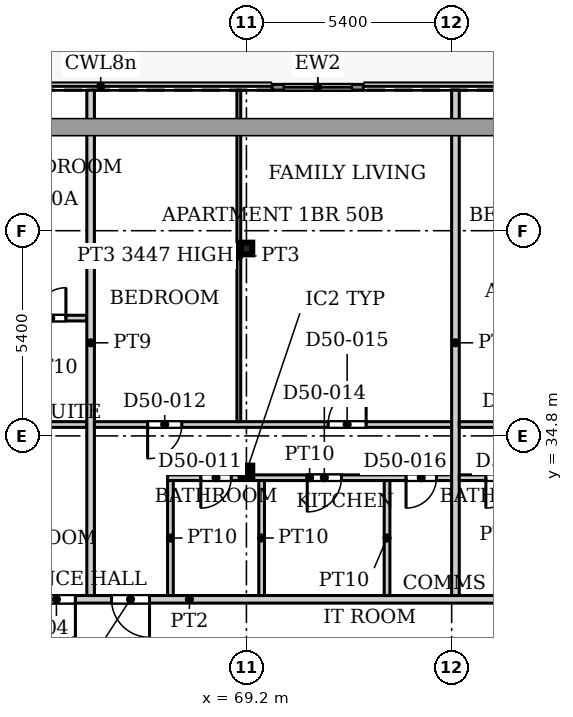
"""IFC4 building model, lengths in metres.
Left out: names, types, materials, properties, quantities, classifications, styles, units other than length and angle.
Written with IfcOpenShell. Run it as: python <this file> out.ifc"""

import sys

from ifc_helpers import new_model, si_unit, direction, frame, frame_2d, origin, origin_2d, place, context, subcontext, project, spatial, rectangle, hollow_rectangle, extrude, source, transform, mapped, element, fill, save


model = new_model("IFC4")
c1 = context("Model", 3, precision=1e-05, world=origin(), true_north=direction((0.0, 1.0)))
c2 = subcontext(c1, "Body", "Model", "MODEL_VIEW")
j1 = project(units=[si_unit("LENGTHUNIT", "METRE"), si_unit("PLANEANGLEUNIT", "RADIAN")], contexts=[c1])
p1 = place(None, origin())
s1 = spatial("IfcSite", under=j1, at=p1, CompositionType="ELEMENT")
p2 = place(p1, origin())
s2 = spatial("IfcBuilding", under=s1, at=p2, CompositionType="ELEMENT")
p3 = place(p2, frame((0.0, 0.0, 216.2)))
s3 = spatial("IfcBuildingStorey", under=s2, at=p3, CompositionType="ELEMENT", Elevation=216.2)
for number, where, z_axis, x_axis in (
    (1, (69.2, 33.863, 0.0), (0.0, 0.0, 1.0), (1.0, 0.0, 0.0)),
    (2, (69.2, 39.732, 0.0), (0.0, 0.0, 1.0), (1.0, 0.0, 0.0)),
):
    element("IfcColumn", number, at=place(p3, frame(where, z_axis=z_axis, x_axis=x_axis)), inside=s3, PredefinedType="COLUMN", context=c2, shape_type="SweptSolid", body=[
        extrude(hollow_rectangle(XDim=0.305, YDim=0.305, WallThickness=0.016, InnerFilletRadius=0.016, OuterFilletRadius=0.032, at=origin_2d()), origin(), (0.0, 0.0, 1.0), 3.9),
    ])
p4 = place(p3, frame((69.877, 43.975, 0.0), z_axis=(0.0, 0.0, 1.0), x_axis=(1.0, 0.0, 0.0)))
e3 = element("IfcWall", 3, at=p4, inside=s3, PredefinedType="SOLIDWALL", context=c2, shape_type="SweptSolid", body=[
    extrude(rectangle(XDim=2.4, YDim=0.15, at=frame_2d((1.2, 0.0))), origin(), (0.0, 0.0, 1.0), 3.75),
])
p5 = place(p4, frame((0.3, 0.0, 0.0)))
e4 = element("IfcOpeningElement", 4, at=p5, cuts=e3, PredefinedType="OPENING", context=c2, shape_type="SweptSolid", body=[
    extrude(rectangle(XDim=1.8, YDim=2.4, at=frame_2d((0.9, 1.2))), frame((0.0, 0.085, 0.0), z_axis=(0.0, -1.0, 0.0), x_axis=(1.0, 0.0, 0.0)), (0.0, 0.0, 1.0), 0.17),
])
p6 = place(p3, frame((53.499, 30.5, 0.0), z_axis=(0.0, 0.0, 1.0), x_axis=(1.0, 0.0, 0.0)))
e5 = element("IfcWall", 5, at=p6, inside=s3, PredefinedType="PARTITIONING", context=c2, shape_type="SweptSolid", body=[
    extrude(rectangle(XDim=28.401, YDim=0.2, at=frame_2d((14.2, 0.0))), origin(), (0.0, 0.0, 1.0), 3.6),
])
p7 = place(p6, frame((10.201, 0.0, 0.0)))
e6 = element("IfcOpeningElement", 6, at=p7, cuts=e5, PredefinedType="OPENING", context=c2, shape_type="SweptSolid", body=[
    extrude(rectangle(XDim=1.0, YDim=2.1, at=frame_2d((0.5, 1.05))), frame((0.0, 0.11, 0.0), z_axis=(0.0, -1.0, 0.0), x_axis=(1.0, 0.0, 0.0)), (0.0, 0.0, 1.0), 0.22),
])
p8 = place(p6, frame((12.151, 0.0, 0.0)))
e7 = element("IfcOpeningElement", 7, at=p8, cuts=e5, PredefinedType="OPENING", context=c2, shape_type="SweptSolid", body=[
    extrude(rectangle(XDim=1.0, YDim=2.1, at=frame_2d((0.5, 1.05))), frame((0.0, 0.11, 0.0), z_axis=(0.0, -1.0, 0.0), x_axis=(1.0, 0.0, 0.0)), (0.0, 0.0, 1.0), 0.22),
])
p9 = place(p6, frame((24.001, 0.0, 0.0)))
e8 = element("IfcOpeningElement", 8, at=p9, cuts=e5, PredefinedType="OPENING", context=c2, shape_type="SweptSolid", body=[
    extrude(rectangle(XDim=1.0, YDim=2.1, at=frame_2d((0.5, 1.05))), frame((0.0, 0.11, 0.0), z_axis=(0.0, -1.0, 0.0), x_axis=(1.0, 0.0, 0.0)), (0.0, 0.0, 1.0), 0.22),
])
p10 = place(p3, frame((53.499, 35.1, 0.0), z_axis=(0.0, 0.0, 1.0), x_axis=(1.0, 0.0, 0.0)))
e9 = element("IfcWall", 9, at=p10, inside=s3, PredefinedType="PARTITIONING", context=c2, shape_type="SweptSolid", body=[
    extrude(rectangle(XDim=11.501, YDim=0.15, at=frame_2d((5.75, 0.0))), origin(), (0.0, 0.0, 1.0), 3.6),
])
p11 = place(p10, frame((5.001, 0.0, 0.0)))
e10 = element("IfcOpeningElement", 10, at=p11, cuts=e9, PredefinedType="OPENING", context=c2, shape_type="SweptSolid", body=[
    extrude(rectangle(XDim=0.9, YDim=2.1, at=frame_2d((0.45, 1.05))), frame((0.0, 0.085, 0.0), z_axis=(0.0, -1.0, 0.0), x_axis=(1.0, 0.0, 0.0)), (0.0, 0.0, 1.0), 0.17),
])
p12 = place(p10, frame((1.701, 0.0, 0.0)))
e11 = element("IfcOpeningElement", 11, at=p12, cuts=e9, PredefinedType="OPENING", context=c2, shape_type="SweptSolid", body=[
    extrude(rectangle(XDim=1.0, YDim=2.1, at=frame_2d((0.5, 1.05))), frame((0.0, 0.085, 0.0), z_axis=(0.0, -1.0, 0.0), x_axis=(1.0, 0.0, 0.0)), (0.0, 0.0, 1.0), 0.17),
])
p13 = place(p10, frame((7.701, 0.0, 0.0)))
e12 = element("IfcOpeningElement", 12, at=p13, cuts=e9, PredefinedType="OPENING", context=c2, shape_type="SweptSolid", body=[
    extrude(rectangle(XDim=0.9, YDim=2.1, at=frame_2d((0.45, 1.05))), frame((0.0, 0.085, 0.0), z_axis=(0.0, -1.0, 0.0), x_axis=(1.0, 0.0, 0.0)), (0.0, 0.0, 1.0), 0.17),
])
p14 = place(p3, frame((63.075, 37.9, 0.0), z_axis=(0.0, 0.0, 1.0), x_axis=(1.0, 0.0, 0.0)))
e13 = element("IfcWall", 13, at=p14, inside=s3, PredefinedType="PARTITIONING", context=c2, shape_type="SweptSolid", body=[
    extrude(rectangle(XDim=1.925, YDim=0.15, at=frame_2d((0.962, 0.0))), origin(), (0.0, 0.0, 1.0), 3.6),
])
p15 = place(p14, frame((0.575, 0.0, 0.0)))
e14 = element("IfcOpeningElement", 14, at=p15, cuts=e13, PredefinedType="OPENING", context=c2, shape_type="SweptSolid", body=[
    extrude(rectangle(XDim=0.8, YDim=2.1, at=frame_2d((0.4, 1.05))), frame((0.0, 0.085, 0.0), z_axis=(0.0, -1.0, 0.0), x_axis=(1.0, 0.0, 0.0)), (0.0, 0.0, 1.0), 0.17),
])
p16 = place(p3, frame((65.1, 30.6, 0.0), z_axis=(0.0, 0.0, 1.0), x_axis=(0.0, 1.0, 0.0)))
e15 = element("IfcWall", 15, at=p16, inside=s3, PredefinedType="PARTITIONING", context=c2, shape_type="SweptSolid", body=[
    extrude(rectangle(XDim=13.3, YDim=0.2, at=frame_2d((6.65, 0.0))), origin(), (0.0, 0.0, 1.0), 3.6),
])
p17 = place(p3, frame((65.2, 35.1, 0.0), z_axis=(0.0, 0.0, 1.0), x_axis=(1.0, 0.0, 0.0)))
e16 = element("IfcWall", 16, at=p17, inside=s3, PredefinedType="PARTITIONING", context=c2, shape_type="SweptSolid", body=[
    extrude(rectangle(XDim=9.4, YDim=0.15, at=frame_2d((4.7, 0.0))), origin(), (0.0, 0.0, 1.0), 3.6),
])
p18 = place(p17, frame((1.4, 0.0, 0.0)))
e17 = element("IfcOpeningElement", 17, at=p18, cuts=e16, PredefinedType="OPENING", context=c2, shape_type="SweptSolid", body=[
    extrude(rectangle(XDim=0.9, YDim=2.1, at=frame_2d((0.45, 1.05))), frame((0.0, 0.085, 0.0), z_axis=(0.0, -1.0, 0.0), x_axis=(1.0, 0.0, 0.0)), (0.0, 0.0, 1.0), 0.17),
])
p19 = place(p17, frame((6.15, 0.0, 0.0)))
e18 = element("IfcOpeningElement", 18, at=p19, cuts=e16, PredefinedType="OPENING", context=c2, shape_type="SweptSolid", body=[
    extrude(rectangle(XDim=1.0, YDim=2.1, at=frame_2d((0.5, 1.05))), frame((0.0, 0.085, 0.0), z_axis=(0.0, -1.0, 0.0), x_axis=(1.0, 0.0, 0.0)), (0.0, 0.0, 1.0), 0.17),
])
p20 = place(p3, frame((67.125, 33.7, 0.0), z_axis=(0.0, 0.0, 1.0), x_axis=(1.0, 0.0, 0.0)))
e19 = element("IfcWall", 19, at=p20, inside=s3, PredefinedType="PARTITIONING", context=c2, shape_type="SweptSolid", body=[
    extrude(rectangle(XDim=7.475, YDim=0.15, at=frame_2d((3.738, 0.0))), origin(), (0.0, 0.0, 1.0), 3.6),
])
p21 = place(p20, frame((0.875, 0.0, 0.0)))
e20 = element("IfcOpeningElement", 20, at=p21, cuts=e19, PredefinedType="OPENING", context=c2, shape_type="SweptSolid", body=[
    extrude(rectangle(XDim=0.8, YDim=2.1, at=frame_2d((0.4, 1.05))), frame((0.0, 0.085, 0.0), z_axis=(0.0, -1.0, 0.0), x_axis=(1.0, 0.0, 0.0)), (0.0, 0.0, 1.0), 0.17),
])
p22 = place(p20, frame((3.675, 0.0, 0.0)))
e21 = element("IfcOpeningElement", 21, at=p22, cuts=e19, PredefinedType="OPENING", context=c2, shape_type="SweptSolid", body=[
    extrude(rectangle(XDim=0.9, YDim=2.1, at=frame_2d((0.45, 1.05))), frame((0.0, 0.085, 0.0), z_axis=(0.0, -1.0, 0.0), x_axis=(1.0, 0.0, 0.0)), (0.0, 0.0, 1.0), 0.17),
])
p23 = place(p20, frame((6.275, 0.0, 0.0)))
e22 = element("IfcOpeningElement", 22, at=p23, cuts=e19, PredefinedType="OPENING", context=c2, shape_type="SweptSolid", body=[
    extrude(rectangle(XDim=0.8, YDim=2.1, at=frame_2d((0.4, 1.05))), frame((0.0, 0.085, 0.0), z_axis=(0.0, -1.0, 0.0), x_axis=(1.0, 0.0, 0.0)), (0.0, 0.0, 1.0), 0.17),
])
p24 = place(p3, frame((67.2, 30.6, 0.0), z_axis=(0.0, 0.0, 1.0), x_axis=(0.0, 1.0, 0.0)))
e23 = element("IfcWall", 23, at=p24, inside=s3, PredefinedType="PARTITIONING", context=c2, shape_type="SweptSolid", body=[
    extrude(rectangle(XDim=3.025, YDim=0.15, at=frame_2d((1.512, 0.0))), origin(), (0.0, 0.0, 1.0), 3.6),
])
p25 = place(p3, frame((69.0, 35.175, 0.0), z_axis=(0.0, 0.0, 1.0), x_axis=(0.0, 1.0, 0.0)))
e24 = element("IfcWall", 24, at=p25, inside=s3, PredefinedType="PARTITIONING", context=c2, shape_type="SweptSolid", body=[
    extrude(rectangle(XDim=8.725, YDim=0.1, at=frame_2d((4.362, 0.0))), origin(), (0.0, 0.0, 1.0), 3.447),
])
for number, where, z_axis, x_axis in (
    (25, (69.6, 30.6, 0.0), (0.0, 0.0, 1.0), (0.0, 1.0, 0.0)),
    (26, (72.9, 30.6, 0.0), (0.0, 0.0, 1.0), (0.0, 1.0, 0.0)),
):
    element("IfcWall", number, at=place(p3, frame(where, z_axis=z_axis, x_axis=x_axis)), inside=s3, PredefinedType="PARTITIONING", context=c2, shape_type="SweptSolid", body=[
        extrude(rectangle(XDim=3.025, YDim=0.15, at=frame_2d((1.512, 0.0))), origin(), (0.0, 0.0, 1.0), 3.6),
    ])
p26 = place(p3, frame((74.7, 30.6, 0.0), z_axis=(0.0, 0.0, 1.0), x_axis=(0.0, 1.0, 0.0)))
e27 = element("IfcWall", 27, at=p26, inside=s3, PredefinedType="PARTITIONING", context=c2, shape_type="SweptSolid", body=[
    extrude(rectangle(XDim=13.3, YDim=0.2, at=frame_2d((6.65, 0.0))), origin(), (0.0, 0.0, 1.0), 3.6),
])
p27 = place(p3, frame((74.8, 33.7, 0.0), z_axis=(0.0, 0.0, 1.0), x_axis=(1.0, 0.0, 0.0)))
e28 = element("IfcWall", 28, at=p27, inside=s3, PredefinedType="PARTITIONING", context=c2, shape_type="SweptSolid", body=[
    extrude(rectangle(XDim=2.225, YDim=0.15, at=frame_2d((1.112, 0.0))), origin(), (0.0, 0.0, 1.0), 3.6),
])
p28 = place(p27, frame((0.7, 0.0, 0.0)))
e29 = element("IfcOpeningElement", 29, at=p28, cuts=e28, PredefinedType="OPENING", context=c2, shape_type="SweptSolid", body=[
    extrude(rectangle(XDim=0.8, YDim=2.1, at=frame_2d((0.4, 1.05))), frame((0.0, 0.085, 0.0), z_axis=(0.0, -1.0, 0.0), x_axis=(1.0, 0.0, 0.0)), (0.0, 0.0, 1.0), 0.17),
])
p29 = place(p3, frame((74.8, 35.1, 0.0), z_axis=(0.0, 0.0, 1.0), x_axis=(1.0, 0.0, 0.0)))
e30 = element("IfcWall", 30, at=p29, inside=s3, PredefinedType="PARTITIONING", context=c2, shape_type="SweptSolid", body=[
    extrude(rectangle(XDim=8.9, YDim=0.15, at=frame_2d((4.45, 0.0))), origin(), (0.0, 0.0, 1.0), 3.6),
])
p30 = place(p29, frame((1.25, 0.0, 0.0)))
e31 = element("IfcOpeningElement", 31, at=p30, cuts=e30, PredefinedType="OPENING", context=c2, shape_type="SweptSolid", body=[
    extrude(rectangle(XDim=0.9, YDim=2.1, at=frame_2d((0.45, 1.05))), frame((0.0, 0.085, 0.0), z_axis=(0.0, -1.0, 0.0), x_axis=(1.0, 0.0, 0.0)), (0.0, 0.0, 1.0), 0.17),
])
p31 = place(p29, frame((5.7, 0.0, 0.0)))
e32 = element("IfcOpeningElement", 32, at=p31, cuts=e30, PredefinedType="OPENING", context=c2, shape_type="SweptSolid", body=[
    extrude(rectangle(XDim=1.0, YDim=2.1, at=frame_2d((0.5, 1.05))), frame((0.0, 0.085, 0.0), z_axis=(0.0, -1.0, 0.0), x_axis=(1.0, 0.0, 0.0)), (0.0, 0.0, 1.0), 0.17),
])
m1 = source(origin(), c2, "Body", "SweptSolid", [
    extrude(rectangle(XDim=1.8, YDim=2.4, at=frame_2d((0.9, 1.2))), frame((0.0, 0.025, 0.0), z_axis=(0.0, -1.0, 0.0), x_axis=(1.0, 0.0, 0.0)), (0.0, 0.0, 1.0), 0.05),
])
p32 = place(p5, origin())
e33 = element("IfcDoor", 33, at=p32, inside=s3, OperationType="SLIDING_TO_LEFT", PredefinedType="DOOR", context=c2, shape_type="MappedRepresentation", body=[
    mapped(m1, transform((0.0, 0.0, 0.0), x_axis=(1.0, 0.0, 0.0), y_axis=(0.0, 1.0, 0.0), z_axis=(0.0, 0.0, 1.0), scale=1.0)),
])
fill(e4, e33)
m2 = source(origin(), c2, "Body", "SweptSolid", [
    extrude(rectangle(XDim=0.8, YDim=2.1, at=frame_2d((0.4, 1.05))), frame((0.0, 0.025, 0.0), z_axis=(0.0, -1.0, 0.0), x_axis=(1.0, 0.0, 0.0)), (0.0, 0.0, 1.0), 0.05),
])
p33 = place(p15, origin())
e34 = element("IfcDoor", 34, at=p33, inside=s3, OperationType="SINGLE_SWING_LEFT", PredefinedType="DOOR", context=c2, shape_type="MappedRepresentation", body=[
    mapped(m2, transform((0.0, 0.0, 0.0), x_axis=(1.0, 0.0, 0.0), y_axis=(0.0, 1.0, 0.0), z_axis=(0.0, 0.0, 1.0), scale=1.0)),
])
fill(e14, e34)
m3 = source(origin(), c2, "Body", "SweptSolid", [
    extrude(rectangle(XDim=1.0, YDim=2.1, at=frame_2d((0.5, 1.05))), frame((0.0, 0.025, 0.0), z_axis=(0.0, -1.0, 0.0), x_axis=(1.0, 0.0, 0.0)), (0.0, 0.0, 1.0), 0.05),
])
p34 = place(p7, origin())
e35 = element("IfcDoor", 35, at=p34, inside=s3, OperationType="SINGLE_SWING_RIGHT", PredefinedType="DOOR", context=c2, shape_type="MappedRepresentation", body=[
    mapped(m3, transform((0.0, 0.0, 0.0), x_axis=(1.0, 0.0, 0.0), y_axis=(0.0, 1.0, 0.0), z_axis=(0.0, 0.0, 1.0), scale=1.0)),
])
fill(e6, e35)
p35 = place(p21, origin())
e36 = element("IfcDoor", 36, at=p35, inside=s3, OperationType="SINGLE_SWING_RIGHT", PredefinedType="DOOR", context=c2, shape_type="MappedRepresentation", body=[
    mapped(m2, transform((0.0, 0.0, 0.0), x_axis=(1.0, 0.0, 0.0), y_axis=(0.0, 1.0, 0.0), z_axis=(0.0, 0.0, 1.0), scale=1.0)),
])
fill(e20, e36)
m4 = source(origin(), c2, "Body", "SweptSolid", [
    extrude(rectangle(XDim=0.9, YDim=2.1, at=frame_2d((0.45, 1.05))), frame((0.0, 0.025, 0.0), z_axis=(0.0, -1.0, 0.0), x_axis=(1.0, 0.0, 0.0)), (0.0, 0.0, 1.0), 0.05),
])
p36 = place(p18, origin())
e37 = element("IfcDoor", 37, at=p36, inside=s3, OperationType="SINGLE_SWING_RIGHT", PredefinedType="DOOR", context=c2, shape_type="MappedRepresentation", body=[
    mapped(m4, transform((0.0, 0.0, 0.0), x_axis=(1.0, 0.0, 0.0), y_axis=(0.0, 1.0, 0.0), z_axis=(0.0, 0.0, 1.0), scale=1.0)),
])
fill(e17, e37)
p37 = place(p8, origin())
e38 = element("IfcDoor", 38, at=p37, inside=s3, OperationType="SINGLE_SWING_RIGHT", PredefinedType="DOOR", context=c2, shape_type="MappedRepresentation", body=[
    mapped(m3, transform((0.0, 0.0, 0.0), x_axis=(1.0, 0.0, 0.0), y_axis=(0.0, 1.0, 0.0), z_axis=(0.0, 0.0, 1.0), scale=1.0)),
])
fill(e7, e38)
p38 = place(p22, origin())
e39 = element("IfcDoor", 39, at=p38, inside=s3, OperationType="SINGLE_SWING_RIGHT", PredefinedType="DOOR", context=c2, shape_type="MappedRepresentation", body=[
    mapped(m4, transform((0.0, 0.0, 0.0), x_axis=(1.0, 0.0, 0.0), y_axis=(0.0, 1.0, 0.0), z_axis=(0.0, 0.0, 1.0), scale=1.0)),
])
fill(e21, e39)
m5 = source(origin(), c2, "Body", "SweptSolid", [
    extrude(rectangle(XDim=1.0, YDim=2.1, at=frame_2d((0.5, 1.05))), frame((0.0, 0.025, 0.0), z_axis=(0.0, -1.0, 0.0), x_axis=(1.0, 0.0, 0.0)), (0.0, 0.0, 1.0), 0.05),
])
p39 = place(p19, origin())
e40 = element("IfcDoor", 40, at=p39, inside=s3, OperationType="SINGLE_SWING_LEFT", PredefinedType="DOOR", context=c2, shape_type="MappedRepresentation", body=[
    mapped(m5, transform((0.0, 0.0, 0.0), x_axis=(1.0, 0.0, 0.0), y_axis=(0.0, 1.0, 0.0), z_axis=(0.0, 0.0, 1.0), scale=1.0)),
])
fill(e18, e40)
p40 = place(p23, origin())
e41 = element("IfcDoor", 41, at=p40, inside=s3, OperationType="SINGLE_SWING_RIGHT", PredefinedType="DOOR", context=c2, shape_type="MappedRepresentation", body=[
    mapped(m2, transform((0.0, 0.0, 0.0), x_axis=(1.0, 0.0, 0.0), y_axis=(0.0, 1.0, 0.0), z_axis=(0.0, 0.0, 1.0), scale=1.0)),
])
fill(e22, e41)
p41 = place(p28, origin())
e42 = element("IfcDoor", 42, at=p41, inside=s3, OperationType="SINGLE_SWING_RIGHT", PredefinedType="DOOR", context=c2, shape_type="MappedRepresentation", body=[
    mapped(m2, transform((0.0, 0.0, 0.0), x_axis=(1.0, 0.0, 0.0), y_axis=(0.0, 1.0, 0.0), z_axis=(0.0, 0.0, 1.0), scale=1.0)),
])
fill(e29, e42)
save(model, sys.argv[1])
